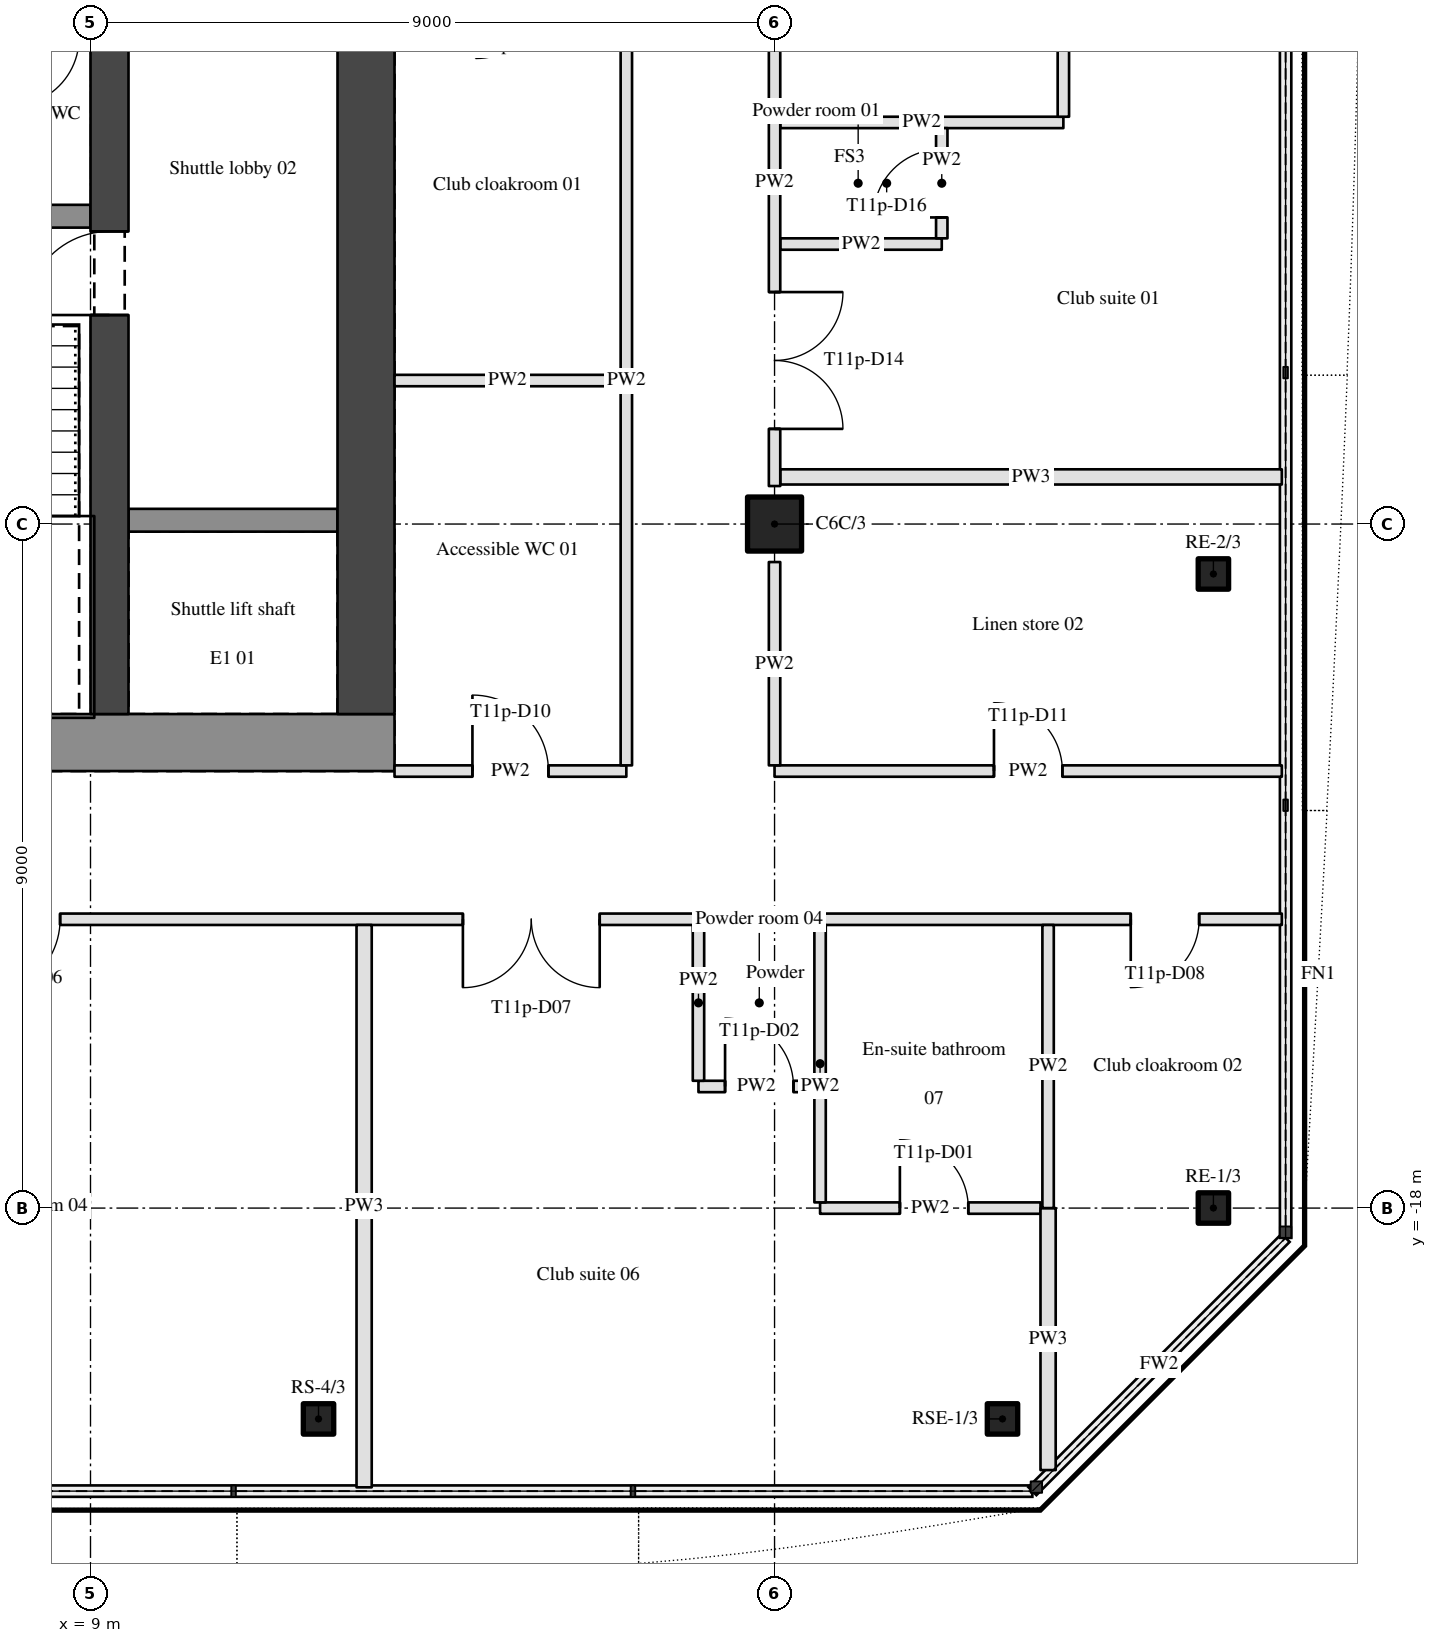
"""IFC4 building model, lengths in metres.
Left out: names, types, materials, properties, quantities, classifications, styles, units other than length and angle.
Written with IfcOpenShell. Run it as: python <this file> out.ifc"""

import sys

from ifc_helpers import new_model, si_unit, direction, frame, frame_2d, origin, origin_2d, place, context, subcontext, project, spatial, rectangle, hollow_rectangle, hollow_circle, extrude, element, fill, save


model = new_model("IFC4")
c1 = context("Model", 3, precision=1e-05, world=origin(), true_north=direction((0.0, 1.0)))
c2 = subcontext(c1, "Body", "Model", "MODEL_VIEW")
j1 = project(units=[si_unit("LENGTHUNIT", "METRE"), si_unit("PLANEANGLEUNIT", "RADIAN")], contexts=[c1])
p1 = place(None, origin())
s1 = spatial("IfcSite", under=j1, at=p1, CompositionType="ELEMENT")
p2 = place(p1, origin())
s2 = spatial("IfcBuilding", under=s1, at=p2, CompositionType="ELEMENT")
p3 = place(p2, frame((0.0, 0.0, 158.9)))
s3 = spatial("IfcBuildingStorey", under=s2, at=p3, CompositionType="ELEMENT", Elevation=158.9)
p4 = place(p3, frame((18.0, -9.0, 0.0), z_axis=(0.0, 0.0, 1.0), x_axis=(1.0, 0.0, 0.0)))
e1 = element("IfcColumn", 1, at=p4, inside=s3, PredefinedType="COLUMN", context=c2, shape_type="SweptSolid", body=[
    extrude(hollow_circle(Radius=0.355, WallThickness=0.032, at=origin_2d()), origin(), (0.0, 0.0, 1.0), 3.4),
])
for number, where, z_axis, x_axis in (
    (2, (12.0, -20.774, 0.0), (0.0, 0.0, 1.0), (1.0, 0.0, 0.0)),
    (3, (20.999, -20.774, 0.0), (0.0, 0.0, 1.0), (1.0, 0.0, 0.0)),
    (4, (23.774, -17.999, 0.0), (0.0, 0.0, 1.0), (1.0, 0.0, 0.0)),
    (5, (23.774, -9.657, 0.0), (0.0, 0.0, 1.0), (1.0, 0.0, 0.0)),
):
    element("IfcColumn", number, at=place(p3, frame(where, z_axis=z_axis, x_axis=x_axis)), inside=s3, PredefinedType="COLUMN", context=c2, shape_type="SweptSolid", body=[
        extrude(hollow_rectangle(XDim=0.4, YDim=0.4, WallThickness=0.02, InnerFilletRadius=0.03, OuterFilletRadius=0.05, at=origin_2d()), origin(), (0.0, 0.0, 1.0), 3.4),
    ])
p5 = place(p3, frame((-13.0, -11.875, 0.0), z_axis=(0.0, 0.0, 1.0), x_axis=(1.0, 0.0, 0.0)))
e6 = element("IfcWall", 6, at=p5, inside=s3, PredefinedType="SHEAR", context=c2, shape_type="SweptSolid", body=[
    extrude(rectangle(XDim=26.0, YDim=0.75, at=frame_2d((13.0, 0.0))), origin(), (0.0, 0.0, 1.0), 3.4),
])
p6 = place(p3, frame((12.625, -11.5, 0.0), z_axis=(0.0, 0.0, 1.0), x_axis=(0.0, 1.0, 0.0)))
e7 = element("IfcWall", 7, at=p6, inside=s3, PredefinedType="SHEAR", context=c2, shape_type="SweptSolid", body=[
    extrude(rectangle(XDim=14.65, YDim=0.75, at=frame_2d((7.325, 0.0))), origin(), (0.0, 0.0, 1.0), 3.4),
])
p7 = place(p6, frame((9.6, 0.0, 0.0)))
e8 = element("IfcOpeningElement", 8, at=p7, cuts=e7, PredefinedType="OPENING", context=c2, shape_type="SweptSolid", body=[
    extrude(rectangle(XDim=1.8, YDim=2.1, at=frame_2d((0.9, 1.05))), frame((0.0, 0.385, 0.0), z_axis=(0.0, -1.0, 0.0), x_axis=(1.0, 0.0, 0.0)), (0.0, 0.0, 1.0), 0.77),
])
p8 = place(p3, frame((9.25, -11.5, 0.0), z_axis=(0.0, 0.0, 1.0), x_axis=(0.0, 1.0, 0.0)))
e9 = element("IfcWall", 9, at=p8, inside=s3, PredefinedType="SHEAR", context=c2, shape_type="SweptSolid", body=[
    extrude(rectangle(XDim=11.65, YDim=0.5, at=frame_2d((5.825, 0.0))), origin(), (0.0, 0.0, 1.0), 3.4),
])
p9 = place(p8, frame((9.4, 0.0, 0.0)))
e10 = element("IfcOpeningElement", 10, at=p9, cuts=e9, PredefinedType="OPENING", context=c2, shape_type="SweptSolid", body=[
    extrude(rectangle(XDim=1.8, YDim=2.1, at=frame_2d((0.9, 1.05))), frame((0.0, 0.26, 0.0), z_axis=(0.0, -1.0, 0.0), x_axis=(1.0, 0.0, 0.0)), (0.0, 0.0, 1.0), 0.52),
])
p10 = place(p8, frame((5.25, 0.0, 0.0)))
e11 = element("IfcOpeningElement", 11, at=p10, cuts=e9, PredefinedType="OPENING", context=c2, shape_type="SweptSolid", body=[
    extrude(rectangle(XDim=1.1, YDim=2.1, at=frame_2d((0.55, 1.05))), frame((0.0, 0.26, 0.0), z_axis=(0.0, -1.0, 0.0), x_axis=(1.0, 0.0, 0.0)), (0.0, 0.0, 1.0), 0.52),
])
p11 = place(p3, frame((18.599, -18.0, 0.0), z_axis=(0.0, 0.0, 1.0), x_axis=(1.0, 0.0, 0.0)))
e12 = element("IfcWall", 12, at=p11, inside=s3, PredefinedType="PARTITIONING", context=c2, shape_type="SweptSolid", body=[
    extrude(rectangle(XDim=2.9, YDim=0.15, at=frame_2d((1.45, 0.0))), origin(), (0.0, 0.0, 1.0), 2.46),
])
p12 = place(p11, frame((1.05, 0.0, 0.0)))
e13 = element("IfcOpeningElement", 13, at=p12, cuts=e12, PredefinedType="OPENING", context=c2, shape_type="SweptSolid", body=[
    extrude(rectangle(XDim=0.9, YDim=2.1, at=frame_2d((0.45, 1.05))), frame((0.0, 0.085, 0.0), z_axis=(0.0, -1.0, 0.0), x_axis=(1.0, 0.0, 0.0)), (0.0, 0.0, 1.0), 0.17),
])
p13 = place(p3, frame((16.999, -16.4, 0.0), z_axis=(0.0, 0.0, 1.0), x_axis=(1.0, 0.0, 0.0)))
e14 = element("IfcWall", 14, at=p13, inside=s3, PredefinedType="PARTITIONING", context=c2, shape_type="SweptSolid", body=[
    extrude(rectangle(XDim=1.525, YDim=0.15, at=frame_2d((0.762, 0.0))), origin(), (0.0, 0.0, 1.0), 2.46),
])
p14 = place(p13, frame((0.35, 0.0, 0.0)))
e15 = element("IfcOpeningElement", 15, at=p14, cuts=e14, PredefinedType="OPENING", context=c2, shape_type="SweptSolid", body=[
    extrude(rectangle(XDim=0.9, YDim=2.1, at=frame_2d((0.45, 1.05))), frame((0.0, 0.085, 0.0), z_axis=(0.0, -1.0, 0.0), x_axis=(1.0, 0.0, 0.0)), (0.0, 0.0, 1.0), 0.17),
])
p15 = place(p3, frame((24.674, -14.2, 0.0), z_axis=(0.0, 0.0, 1.0), x_axis=(-1.0, 0.0, 0.0)))
e16 = element("IfcWall", 16, at=p15, inside=s3, PredefinedType="PARTITIONING", context=c2, shape_type="SweptSolid", body=[
    extrude(rectangle(XDim=43.348, YDim=0.15, at=frame_2d((21.674, 0.0))), origin(), (0.0, 0.0, 1.0), 2.46),
])
p16 = place(p15, frame((40.71, 0.0, 0.0)))
e17 = element("IfcOpeningElement", 17, at=p16, cuts=e16, PredefinedType="OPENING", context=c2, shape_type="SweptSolid", body=[
    extrude(rectangle(XDim=1.0, YDim=2.1, at=frame_2d((0.5, 1.05))), frame((0.0, 0.085, 0.0), z_axis=(0.0, -1.0, 0.0), x_axis=(1.0, 0.0, 0.0)), (0.0, 0.0, 1.0), 0.17),
])
p17 = place(p15, frame((34.073, 0.0, 0.0)))
e18 = element("IfcOpeningElement", 18, at=p17, cuts=e16, PredefinedType="OPENING", context=c2, shape_type="SweptSolid", body=[
    extrude(rectangle(XDim=1.0, YDim=2.1, at=frame_2d((0.5, 1.05))), frame((0.0, 0.085, 0.0), z_axis=(0.0, -1.0, 0.0), x_axis=(1.0, 0.0, 0.0)), (0.0, 0.0, 1.0), 0.17),
])
p18 = place(p15, frame((24.674, 0.0, 0.0)))
e19 = element("IfcOpeningElement", 19, at=p18, cuts=e16, PredefinedType="OPENING", context=c2, shape_type="SweptSolid", body=[
    extrude(rectangle(XDim=1.8, YDim=2.1, at=frame_2d((0.9, 1.05))), frame((0.0, 0.085, 0.0), z_axis=(0.0, -1.0, 0.0), x_axis=(1.0, 0.0, 0.0)), (0.0, 0.0, 1.0), 0.17),
])
p19 = place(p15, frame((16.074, 0.0, 0.0)))
e20 = element("IfcOpeningElement", 20, at=p19, cuts=e16, PredefinedType="OPENING", context=c2, shape_type="SweptSolid", body=[
    extrude(rectangle(XDim=1.0, YDim=2.1, at=frame_2d((0.5, 1.05))), frame((0.0, 0.085, 0.0), z_axis=(0.0, -1.0, 0.0), x_axis=(1.0, 0.0, 0.0)), (0.0, 0.0, 1.0), 0.17),
])
p20 = place(p15, frame((8.975, 0.0, 0.0)))
e21 = element("IfcOpeningElement", 21, at=p20, cuts=e16, PredefinedType="OPENING", context=c2, shape_type="SweptSolid", body=[
    extrude(rectangle(XDim=1.8, YDim=2.1, at=frame_2d((0.9, 1.05))), frame((0.0, 0.085, 0.0), z_axis=(0.0, -1.0, 0.0), x_axis=(1.0, 0.0, 0.0)), (0.0, 0.0, 1.0), 0.17),
])
p21 = place(p15, frame((1.087, 0.0, 0.0)))
e22 = element("IfcOpeningElement", 22, at=p21, cuts=e16, PredefinedType="OPENING", context=c2, shape_type="SweptSolid", body=[
    extrude(rectangle(XDim=0.9, YDim=2.1, at=frame_2d((0.45, 1.05))), frame((0.0, 0.085, 0.0), z_axis=(0.0, -1.0, 0.0), x_axis=(1.0, 0.0, 0.0)), (0.0, 0.0, 1.0), 0.17),
])
p22 = place(p3, frame((13.0, -12.25, 0.0), z_axis=(0.0, 0.0, 1.0), x_axis=(1.0, 0.0, 0.0)))
e23 = element("IfcWall", 23, at=p22, inside=s3, PredefinedType="PARTITIONING", context=c2, shape_type="SweptSolid", body=[
    extrude(rectangle(XDim=3.05, YDim=0.15, at=frame_2d((1.525, 0.0))), origin(), (0.0, 0.0, 1.0), 2.46),
])
p23 = place(p22, frame((1.025, 0.0, 0.0)))
e24 = element("IfcOpeningElement", 24, at=p23, cuts=e23, PredefinedType="OPENING", context=c2, shape_type="SweptSolid", body=[
    extrude(rectangle(XDim=1.0, YDim=2.1, at=frame_2d((0.5, 1.05))), frame((0.0, 0.085, 0.0), z_axis=(0.0, -1.0, 0.0), x_axis=(1.0, 0.0, 0.0)), (0.0, 0.0, 1.0), 0.17),
])
p24 = place(p3, frame((18.0, -12.25, 0.0), z_axis=(0.0, 0.0, 1.0), x_axis=(1.0, 0.0, 0.0)))
e25 = element("IfcWall", 25, at=p24, inside=s3, PredefinedType="PARTITIONING", context=c2, shape_type="SweptSolid", body=[
    extrude(rectangle(XDim=6.674, YDim=0.15, at=frame_2d((3.337, 0.0))), origin(), (0.0, 0.0, 1.0), 2.46),
])
p25 = place(p24, frame((2.887, 0.0, 0.0)))
e26 = element("IfcOpeningElement", 26, at=p25, cuts=e25, PredefinedType="OPENING", context=c2, shape_type="SweptSolid", body=[
    extrude(rectangle(XDim=0.9, YDim=2.1, at=frame_2d((0.45, 1.05))), frame((0.0, 0.085, 0.0), z_axis=(0.0, -1.0, 0.0), x_axis=(1.0, 0.0, 0.0)), (0.0, 0.0, 1.0), 0.17),
])
p26 = place(p3, frame((9.5, -8.95, 0.0), z_axis=(0.0, 0.0, 1.0), x_axis=(1.0, 0.0, 0.0)))
e27 = element("IfcWall", 27, at=p26, inside=s3, PredefinedType="SHEAR", context=c2, shape_type="SweptSolid", body=[
    extrude(rectangle(XDim=2.75, YDim=0.3, at=frame_2d((1.375, 0.0))), origin(), (0.0, 0.0, 1.0), 3.4),
])
p27 = place(p3, frame((18.075, -8.38, 0.0), z_axis=(0.0, 0.0, 1.0), x_axis=(1.0, 0.0, 0.0)))
e28 = element("IfcWall", 28, at=p27, inside=s3, PredefinedType="PARTITIONING", context=c2, shape_type="SweptSolid", body=[
    extrude(rectangle(XDim=6.599, YDim=0.2, at=frame_2d((3.3, 0.0))), origin(), (0.0, 0.0, 1.0), 2.46),
])
p28 = place(p3, frame((13.0, -7.112, 0.0), z_axis=(0.0, 0.0, 1.0), x_axis=(1.0, 0.0, 0.0)))
e29 = element("IfcWall", 29, at=p28, inside=s3, PredefinedType="PARTITIONING", context=c2, shape_type="SweptSolid", body=[
    extrude(rectangle(XDim=2.975, YDim=0.15, at=frame_2d((1.488, 0.0))), origin(), (0.0, 0.0, 1.0), 2.46),
])
p29 = place(p3, frame((18.075, -5.316, 0.0), z_axis=(0.0, 0.0, 1.0), x_axis=(1.0, 0.0, 0.0)))
e30 = element("IfcWall", 30, at=p29, inside=s3, PredefinedType="PARTITIONING", context=c2, shape_type="SweptSolid", body=[
    extrude(rectangle(XDim=2.125, YDim=0.15, at=frame_2d((1.062, 0.0))), origin(), (0.0, 0.0, 1.0), 2.46),
])
p30 = place(p3, frame((2.25, -4.95, 0.0), z_axis=(0.0, 0.0, 1.0), x_axis=(1.0, 0.0, 0.0)))
e31 = element("IfcWall", 31, at=p30, inside=s3, PredefinedType="SHEAR", context=c2, shape_type="SweptSolid", body=[
    extrude(rectangle(XDim=6.75, YDim=0.3, at=frame_2d((3.375, 0.0))), origin(), (0.0, 0.0, 1.0), 3.4),
])
p31 = place(p3, frame((18.075, -3.716, 0.0), z_axis=(0.0, 0.0, 1.0), x_axis=(1.0, 0.0, 0.0)))
e32 = element("IfcWall", 32, at=p31, inside=s3, PredefinedType="PARTITIONING", context=c2, shape_type="SweptSolid", body=[
    extrude(rectangle(XDim=3.725, YDim=0.15, at=frame_2d((1.863, 0.0))), origin(), (0.0, 0.0, 1.0), 2.46),
])
p32 = place(p3, frame((12.6, -21.674, 0.0), z_axis=(0.0, 0.0, 1.0), x_axis=(0.0, 1.0, 0.0)))
e33 = element("IfcWall", 33, at=p32, inside=s3, PredefinedType="PARTITIONING", context=c2, shape_type="SweptSolid", body=[
    extrude(rectangle(XDim=7.399, YDim=0.2, at=frame_2d((3.7, 0.0))), origin(), (0.0, 0.0, 1.0), 2.46),
])
p33 = place(p3, frame((16.05, -12.175, 0.0), z_axis=(0.0, 0.0, 1.0), x_axis=(0.0, 1.0, 0.0)))
e34 = element("IfcWall", 34, at=p33, inside=s3, PredefinedType="PARTITIONING", context=c2, shape_type="SweptSolid", body=[
    extrude(rectangle(XDim=10.125, YDim=0.15, at=frame_2d((5.062, 0.0))), origin(), (0.0, 0.0, 1.0), 2.46),
])
p34 = place(p3, frame((16.999, -16.325, 0.0), z_axis=(0.0, 0.0, 1.0), x_axis=(0.0, 1.0, 0.0)))
e35 = element("IfcWall", 35, at=p34, inside=s3, PredefinedType="PARTITIONING", context=c2, shape_type="SweptSolid", body=[
    extrude(rectangle(XDim=2.05, YDim=0.15, at=frame_2d((1.025, 0.0))), origin(), (0.0, 0.0, 1.0), 2.46),
])
p35 = place(p3, frame((18.0, -12.175, 0.0), z_axis=(0.0, 0.0, 1.0), x_axis=(0.0, 1.0, 0.0)))
e36 = element("IfcWall", 36, at=p35, inside=s3, PredefinedType="PARTITIONING", context=c2, shape_type="SweptSolid", body=[
    extrude(rectangle(XDim=2.675, YDim=0.15, at=frame_2d((1.337, 0.0))), origin(), (0.0, 0.0, 1.0), 2.46),
])
p36 = place(p3, frame((18.0, -0.5, 0.0), z_axis=(0.0, 0.0, 1.0), x_axis=(0.0, -1.0, 0.0)))
e37 = element("IfcWall", 37, at=p36, inside=s3, PredefinedType="PARTITIONING", context=c2, shape_type="SweptSolid", body=[
    extrude(rectangle(XDim=8.0, YDim=0.15, at=frame_2d((4.0, 0.0))), origin(), (0.0, 0.0, 1.0), 2.46),
])
p37 = place(p36, frame((5.448, 0.0, 0.0)))
e38 = element("IfcOpeningElement", 38, at=p37, cuts=e37, PredefinedType="OPENING", context=c2, shape_type="SweptSolid", body=[
    extrude(rectangle(XDim=1.8, YDim=2.1, at=frame_2d((0.9, 1.05))), frame((0.0, 0.085, 0.0), z_axis=(0.0, -1.0, 0.0), x_axis=(1.0, 0.0, 0.0)), (0.0, 0.0, 1.0), 0.17),
])
p38 = place(p3, frame((18.599, -17.925, 0.0), z_axis=(0.0, 0.0, 1.0), x_axis=(0.0, 1.0, 0.0)))
e39 = element("IfcWall", 39, at=p38, inside=s3, PredefinedType="PARTITIONING", context=c2, shape_type="SweptSolid", body=[
    extrude(rectangle(XDim=3.65, YDim=0.15, at=frame_2d((1.825, 0.0))), origin(), (0.0, 0.0, 1.0), 2.46),
])
p39 = place(p3, frame((20.2, -5.241, 0.0), z_axis=(0.0, 0.0, 1.0), x_axis=(0.0, 1.0, 0.0)))
e40 = element("IfcWall", 40, at=p39, inside=s3, PredefinedType="PARTITIONING", context=c2, shape_type="SweptSolid", body=[
    extrude(rectangle(XDim=1.45, YDim=0.15, at=frame_2d((0.725, 0.0))), origin(), (0.0, 0.0, 1.0), 2.46),
])
p40 = place(p39, frame((0.275, 0.0, 0.0)))
e41 = element("IfcOpeningElement", 41, at=p40, cuts=e40, PredefinedType="OPENING", context=c2, shape_type="SweptSolid", body=[
    extrude(rectangle(XDim=0.9, YDim=2.1, at=frame_2d((0.45, 1.05))), frame((0.0, 0.085, 0.0), z_axis=(0.0, -1.0, 0.0), x_axis=(1.0, 0.0, 0.0)), (0.0, 0.0, 1.0), 0.17),
])
p41 = place(p3, frame((21.599, -21.447, 0.0), z_axis=(0.0, 0.0, 1.0), x_axis=(0.0, 1.0, 0.0)))
e42 = element("IfcWall", 42, at=p41, inside=s3, PredefinedType="PARTITIONING", context=c2, shape_type="SweptSolid", body=[
    extrude(rectangle(XDim=3.447, YDim=0.2, at=frame_2d((1.724, 0.0))), origin(), (0.0, 0.0, 1.0), 2.46),
])
p42 = place(p3, frame((21.599, -18.0, 0.0), z_axis=(0.0, 0.0, 1.0), x_axis=(0.0, 1.0, 0.0)))
e43 = element("IfcWall", 43, at=p42, inside=s3, PredefinedType="PARTITIONING", context=c2, shape_type="SweptSolid", body=[
    extrude(rectangle(XDim=3.725, YDim=0.15, at=frame_2d((1.863, 0.0))), origin(), (0.0, 0.0, 1.0), 2.46),
])
p43 = place(p3, frame((21.8, -3.641, 0.0), z_axis=(0.0, 0.0, 1.0), x_axis=(0.0, 1.0, 0.0)))
e44 = element("IfcWall", 44, at=p43, inside=s3, PredefinedType="PARTITIONING", context=c2, shape_type="SweptSolid", body=[
    extrude(rectangle(XDim=2.825, YDim=0.15, at=frame_2d((1.413, 0.0))), origin(), (0.0, 0.0, 1.0), 2.46),
])
p44 = place(p43, frame((0.975, 0.0, 0.0)))
e45 = element("IfcOpeningElement", 45, at=p44, cuts=e44, PredefinedType="OPENING", context=c2, shape_type="SweptSolid", body=[
    extrude(rectangle(XDim=0.9, YDim=2.1, at=frame_2d((0.45, 1.05))), frame((0.0, 0.085, 0.0), z_axis=(0.0, -1.0, 0.0), x_axis=(1.0, 0.0, 0.0)), (0.0, 0.0, 1.0), 0.17),
])
p45 = place(p10, origin())
e46 = element("IfcDoor", 46, at=p45, inside=s3, OperationType="SINGLE_SWING_LEFT", PredefinedType="DOOR", context=c2, shape_type="SweptSolid", body=[
    extrude(rectangle(XDim=1.1, YDim=2.1, at=frame_2d((0.55, 1.05))), frame((0.0, 0.025, 0.0), z_axis=(0.0, -1.0, 0.0), x_axis=(1.0, 0.0, 0.0)), (0.0, 0.0, 1.0), 0.05),
])
fill(e11, e46)
p46 = place(p25, origin())
e47 = element("IfcDoor", 47, at=p46, inside=s3, OperationType="SINGLE_SWING_LEFT", PredefinedType="DOOR", context=c2, shape_type="SweptSolid", body=[
    extrude(rectangle(XDim=0.9, YDim=2.1, at=frame_2d((0.45, 1.05))), frame((0.0, 0.025, 0.0), z_axis=(0.0, -1.0, 0.0), x_axis=(1.0, 0.0, 0.0)), (0.0, 0.0, 1.0), 0.05),
])
fill(e26, e47)
p47 = place(p37, origin())
e48 = element("IfcDoor", 48, at=p47, inside=s3, OperationType="DOUBLE_DOOR_SINGLE_SWING", PredefinedType="DOOR", context=c2, shape_type="SweptSolid", body=[
    extrude(rectangle(XDim=1.8, YDim=2.1, at=frame_2d((0.9, 1.05))), frame((0.0, 0.025, 0.0), z_axis=(0.0, -1.0, 0.0), x_axis=(1.0, 0.0, 0.0)), (0.0, 0.0, 1.0), 0.05),
])
fill(e38, e48)
p48 = place(p23, origin())
e49 = element("IfcDoor", 49, at=p48, inside=s3, OperationType="SINGLE_SWING_LEFT", PredefinedType="DOOR", context=c2, shape_type="SweptSolid", body=[
    extrude(rectangle(XDim=1.0, YDim=2.1, at=frame_2d((0.5, 1.05))), frame((0.0, 0.025, 0.0), z_axis=(0.0, -1.0, 0.0), x_axis=(1.0, 0.0, 0.0)), (0.0, 0.0, 1.0), 0.05),
])
fill(e24, e49)
p49 = place(p19, origin())
e50 = element("IfcDoor", 50, at=p49, inside=s3, OperationType="SINGLE_SWING_RIGHT", PredefinedType="DOOR", context=c2, shape_type="SweptSolid", body=[
    extrude(rectangle(XDim=1.0, YDim=2.1, at=frame_2d((0.5, 1.05))), frame((0.0, 0.025, 0.0), z_axis=(0.0, -1.0, 0.0), x_axis=(1.0, 0.0, 0.0)), (0.0, 0.0, 1.0), 0.05),
])
fill(e20, e50)
p50 = place(p20, origin())
e51 = element("IfcDoor", 51, at=p50, inside=s3, OperationType="DOUBLE_DOOR_SINGLE_SWING", PredefinedType="DOOR", context=c2, shape_type="SweptSolid", body=[
    extrude(rectangle(XDim=1.8, YDim=2.1, at=frame_2d((0.9, 1.05))), frame((0.0, 0.025, 0.0), z_axis=(0.0, -1.0, 0.0), x_axis=(1.0, 0.0, 0.0)), (0.0, 0.0, 1.0), 0.05),
])
fill(e21, e51)
p51 = place(p21, origin())
e52 = element("IfcDoor", 52, at=p51, inside=s3, OperationType="SINGLE_SWING_RIGHT", PredefinedType="DOOR", context=c2, shape_type="SweptSolid", body=[
    extrude(rectangle(XDim=0.9, YDim=2.1, at=frame_2d((0.45, 1.05))), frame((0.0, 0.025, 0.0), z_axis=(0.0, -1.0, 0.0), x_axis=(1.0, 0.0, 0.0)), (0.0, 0.0, 1.0), 0.05),
])
fill(e22, e52)
p52 = place(p40, origin())
e53 = element("IfcDoor", 53, at=p52, inside=s3, OperationType="SINGLE_SWING_LEFT", PredefinedType="DOOR", context=c2, shape_type="SweptSolid", body=[
    extrude(rectangle(XDim=0.9, YDim=2.1, at=frame_2d((0.45, 1.05))), frame((0.0, 0.025, 0.0), z_axis=(0.0, -1.0, 0.0), x_axis=(1.0, 0.0, 0.0)), (0.0, 0.0, 1.0), 0.05),
])
fill(e41, e53)
p53 = place(p12, origin())
e54 = element("IfcDoor", 54, at=p53, inside=s3, OperationType="SINGLE_SWING_LEFT", PredefinedType="DOOR", context=c2, shape_type="SweptSolid", body=[
    extrude(rectangle(XDim=0.9, YDim=2.1, at=frame_2d((0.45, 1.05))), frame((0.0, 0.025, 0.0), z_axis=(0.0, -1.0, 0.0), x_axis=(1.0, 0.0, 0.0)), (0.0, 0.0, 1.0), 0.05),
])
fill(e13, e54)
p54 = place(p14, origin())
e55 = element("IfcDoor", 55, at=p54, inside=s3, OperationType="SINGLE_SWING_LEFT", PredefinedType="DOOR", context=c2, shape_type="SweptSolid", body=[
    extrude(rectangle(XDim=0.9, YDim=2.1, at=frame_2d((0.45, 1.05))), frame((0.0, 0.025, 0.0), z_axis=(0.0, -1.0, 0.0), x_axis=(1.0, 0.0, 0.0)), (0.0, 0.0, 1.0), 0.05),
])
fill(e15, e55)
save(model, sys.argv[1])
